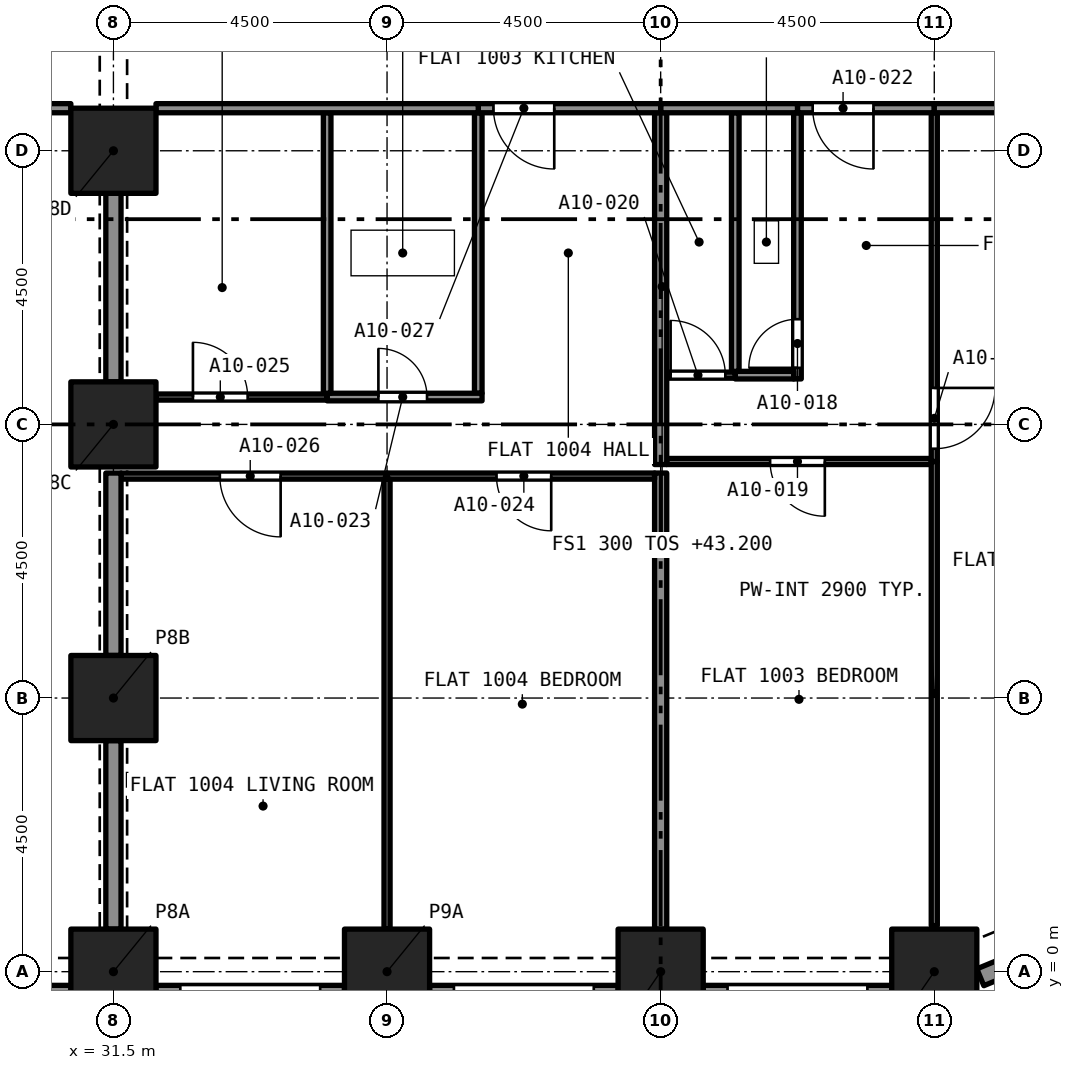
"""IFC4 building model, lengths in metres.
Left out: names, types, materials, properties, quantities, classifications, styles, units other than length and angle.
Written with IfcOpenShell. Run it as: python <this file> out.ifc"""

import sys

from ifc_helpers import new_model, si_unit, direction, frame, frame_2d, origin, origin_2d, place, context, subcontext, project, spatial, rectangle, extrude, element, fill, save


model = new_model("IFC4")
c1 = context("Model", 3, precision=1e-05, world=origin(), true_north=direction((0.0, 1.0)))
c2 = subcontext(c1, "Body", "Model", "MODEL_VIEW")
j1 = project(units=[si_unit("LENGTHUNIT", "METRE"), si_unit("PLANEANGLEUNIT", "RADIAN")], contexts=[c1])
p1 = place(None, origin())
s1 = spatial("IfcSite", under=j1, at=p1, CompositionType="ELEMENT")
p2 = place(p1, origin())
s2 = spatial("IfcBuilding", under=s1, at=p2, CompositionType="ELEMENT")
p3 = place(p2, frame((0.0, 0.0, 43.2)))
s3 = spatial("IfcBuildingStorey", under=s2, at=p3, CompositionType="ELEMENT", Elevation=43.2)
for number, where, z_axis, x_axis in (
    (1, (31.5, 0.0, 0.0), (0.0, 0.0, 1.0), (1.0, 0.0, 0.0)),
    (2, (36.0, 0.0, 0.0), (0.0, 0.0, 1.0), (1.0, 0.0, 0.0)),
    (3, (40.5, 0.0, 0.0), (0.0, 0.0, 1.0), (1.0, 0.0, 0.0)),
    (4, (45.0, 0.0, 0.0), (0.0, 0.0, 1.0), (1.0, 0.0, 0.0)),
    (5, (31.5, 4.5, 0.0), (0.0, 0.0, 1.0), (1.0, 0.0, 0.0)),
    (6, (31.5, 9.0, 0.0), (0.0, 0.0, 1.0), (1.0, 0.0, 0.0)),
    (7, (31.5, 13.5, 0.0), (0.0, 0.0, 1.0), (1.0, 0.0, 0.0)),
):
    element("IfcColumn", number, at=place(p3, frame(where, z_axis=z_axis, x_axis=x_axis)), inside=s3, PredefinedType="COLUMN", context=c2, shape_type="SweptSolid", body=[
        extrude(rectangle(XDim=1.4, YDim=1.4, at=origin_2d()), origin(), (0.0, 0.0, 1.0), 3.2),
    ])
p4 = place(p3, frame((30.8, -0.375, 0.0), z_axis=(0.0, 0.0, 1.0), x_axis=(-1.0, 0.0, 0.0)))
e8 = element("IfcWall", 8, at=p4, inside=s3, PredefinedType="SOLIDWALL", context=c2, shape_type="SweptSolid", body=[
    extrude(rectangle(XDim=3.1, YDim=0.3, at=frame_2d((1.55, 0.0))), origin(), (0.0, 0.0, 1.0), 3.2),
])
p5 = place(p4, frame((0.4, 0.0, 0.45)))
e9 = element("IfcOpeningElement", 9, at=p5, cuts=e8, PredefinedType="OPENING", context=c2, shape_type="SweptSolid", body=[
    extrude(rectangle(XDim=2.3, YDim=1.95, at=frame_2d((1.15, 0.975))), frame((0.0, 0.16, 0.0), z_axis=(0.0, -1.0, 0.0), x_axis=(1.0, 0.0, 0.0)), (0.0, 0.0, 1.0), 0.32),
])
p6 = place(p3, frame((35.3, -0.375, 0.0), z_axis=(0.0, 0.0, 1.0), x_axis=(-1.0, 0.0, 0.0)))
e10 = element("IfcWall", 10, at=p6, inside=s3, PredefinedType="SOLIDWALL", context=c2, shape_type="SweptSolid", body=[
    extrude(rectangle(XDim=3.1, YDim=0.3, at=frame_2d((1.55, 0.0))), origin(), (0.0, 0.0, 1.0), 3.2),
])
p7 = place(p6, frame((0.4, 0.0, 0.45)))
e11 = element("IfcOpeningElement", 11, at=p7, cuts=e10, PredefinedType="OPENING", context=c2, shape_type="SweptSolid", body=[
    extrude(rectangle(XDim=2.3, YDim=1.95, at=frame_2d((1.15, 0.975))), frame((0.0, 0.16, 0.0), z_axis=(0.0, -1.0, 0.0), x_axis=(1.0, 0.0, 0.0)), (0.0, 0.0, 1.0), 0.32),
])
p8 = place(p3, frame((39.8, -0.375, 0.0), z_axis=(0.0, 0.0, 1.0), x_axis=(-1.0, 0.0, 0.0)))
e12 = element("IfcWall", 12, at=p8, inside=s3, PredefinedType="SOLIDWALL", context=c2, shape_type="SweptSolid", body=[
    extrude(rectangle(XDim=3.1, YDim=0.3, at=frame_2d((1.55, 0.0))), origin(), (0.0, 0.0, 1.0), 3.2),
])
p9 = place(p8, frame((0.4, 0.0, 0.45)))
e13 = element("IfcOpeningElement", 13, at=p9, cuts=e12, PredefinedType="OPENING", context=c2, shape_type="SweptSolid", body=[
    extrude(rectangle(XDim=2.3, YDim=1.95, at=frame_2d((1.15, 0.975))), frame((0.0, 0.16, 0.0), z_axis=(0.0, -1.0, 0.0), x_axis=(1.0, 0.0, 0.0)), (0.0, 0.0, 1.0), 0.32),
])
p10 = place(p3, frame((44.3, -0.375, 0.0), z_axis=(0.0, 0.0, 1.0), x_axis=(-1.0, 0.0, 0.0)))
e14 = element("IfcWall", 14, at=p10, inside=s3, PredefinedType="SOLIDWALL", context=c2, shape_type="SweptSolid", body=[
    extrude(rectangle(XDim=3.1, YDim=0.3, at=frame_2d((1.55, 0.0))), origin(), (0.0, 0.0, 1.0), 3.2),
])
p11 = place(p10, frame((0.4, 0.0, 0.45)))
e15 = element("IfcOpeningElement", 15, at=p11, cuts=e14, PredefinedType="OPENING", context=c2, shape_type="SweptSolid", body=[
    extrude(rectangle(XDim=2.3, YDim=1.95, at=frame_2d((1.15, 0.975))), frame((0.0, 0.16, 0.0), z_axis=(0.0, -1.0, 0.0), x_axis=(1.0, 0.0, 0.0)), (0.0, 0.0, 1.0), 0.32),
])
p12 = place(p3, frame((47.48, 0.622, 0.0), z_axis=(0.0, 0.0, 1.0), x_axis=(-0.923903565336, -0.38262540684, 0.0)))
e16 = element("IfcWall", 16, at=p12, inside=s3, PredefinedType="SOLIDWALL", context=c2, shape_type="SweptSolid", body=[
    extrude(rectangle(XDim=1.865, YDim=0.3, at=frame_2d((0.933, 0.0))), origin(), (0.0, 0.0, 1.0), 3.2),
])
p13 = place(p12, frame((0.258, 0.0, 0.45)))
e17 = element("IfcOpeningElement", 17, at=p13, cuts=e16, PredefinedType="OPENING", context=c2, shape_type="SweptSolid", body=[
    extrude(rectangle(XDim=1.1, YDim=1.95, at=frame_2d((0.55, 0.975))), frame((0.0, 0.16, 0.0), z_axis=(0.0, -1.0, 0.0), x_axis=(1.0, 0.0, 0.0)), (0.0, 0.0, 1.0), 0.32),
])
p14 = place(p3, frame((42.75, 9.748, 0.0), z_axis=(0.0, 0.0, 1.0), x_axis=(0.0, 1.0, 0.0)))
e18 = element("IfcWall", 18, at=p14, inside=s3, PredefinedType="PARTITIONING", context=c2, shape_type="SweptSolid", body=[
    extrude(rectangle(XDim=4.377, YDim=0.125, at=frame_2d((2.189, 0.0))), origin(), (0.0, 0.0, 1.0), 2.9),
])
p15 = place(p14, frame((0.183, 0.0, 0.0)))
e19 = element("IfcOpeningElement", 19, at=p15, cuts=e18, PredefinedType="OPENING", context=c2, shape_type="SweptSolid", body=[
    extrude(rectangle(XDim=0.8, YDim=2.1, at=frame_2d((0.4, 1.05))), frame((0.0, 0.073, 0.0), z_axis=(0.0, -1.0, 0.0), x_axis=(1.0, 0.0, 0.0)), (0.0, 0.0, 1.0), 0.145),
])
p16 = place(p3, frame((41.727, 9.81, 0.0), z_axis=(0.0, 0.0, 1.0), x_axis=(1.0, 0.0, 0.0)))
e20 = element("IfcWall", 20, at=p16, inside=s3, PredefinedType="PARTITIONING", context=c2, shape_type="SweptSolid", body=[
    extrude(rectangle(XDim=0.96, YDim=0.125, at=frame_2d((0.48, 0.0))), origin(), (0.0, 0.0, 1.0), 2.9),
])
p17 = place(p3, frame((41.727, 9.873, 0.0), z_axis=(0.0, 0.0, 1.0), x_axis=(0.0, 1.0, 0.0)))
e21 = element("IfcWall", 21, at=p17, inside=s3, PredefinedType="PARTITIONING", context=c2, shape_type="SweptSolid", body=[
    extrude(rectangle(XDim=4.252, YDim=0.125, at=frame_2d((2.126, 0.0))), origin(), (0.0, 0.0, 1.0), 2.9),
])
p18 = place(p3, frame((44.95, 8.39, 0.0), z_axis=(0.0, 0.0, 1.0), x_axis=(-1.0, 0.0, 0.0)))
e22 = element("IfcWall", 22, at=p18, inside=s3, PredefinedType="PARTITIONING", context=c2, shape_type="SweptSolid", body=[
    extrude(rectangle(XDim=4.35, YDim=0.1, at=frame_2d((2.175, 0.0))), origin(), (0.0, 0.0, 1.0), 2.9),
])
p19 = place(p18, frame((1.75, 0.0, 0.0)))
e23 = element("IfcOpeningElement", 23, at=p19, cuts=e22, PredefinedType="OPENING", context=c2, shape_type="SweptSolid", body=[
    extrude(rectangle(XDim=0.9, YDim=2.1, at=frame_2d((0.45, 1.05))), frame((0.0, 0.06, 0.0), z_axis=(0.0, -1.0, 0.0), x_axis=(1.0, 0.0, 0.0)), (0.0, 0.0, 1.0), 0.12),
])
p20 = place(p3, frame((45.0, 0.758, 0.0), z_axis=(0.0, 0.0, 1.0), x_axis=(0.0, 1.0, 0.0)))
e24 = element("IfcWall", 24, at=p20, inside=s3, PredefinedType="PARTITIONING", context=c2, shape_type="SweptSolid", body=[
    extrude(rectangle(XDim=7.632, YDim=0.1, at=frame_2d((3.816, 0.0))), origin(), (0.0, 0.0, 1.0), 2.9),
])
p21 = place(p3, frame((40.5, 0.7, 0.0), z_axis=(0.0, 0.0, 1.0), x_axis=(0.0, 1.0, 0.0)))
e25 = element("IfcWall", 25, at=p21, inside=s3, PredefinedType="PARTITIONING", context=c2, shape_type="SweptSolid", body=[
    extrude(rectangle(XDim=7.5, YDim=0.2, at=frame_2d((3.75, 0.0))), origin(), (0.0, 0.0, 1.0), 2.9),
])
p22 = place(p3, frame((40.6, 9.81, 0.0), z_axis=(0.0, 0.0, 1.0), x_axis=(1.0, 0.0, 0.0)))
e26 = element("IfcWall", 26, at=p22, inside=s3, PredefinedType="PARTITIONING", context=c2, shape_type="SweptSolid", body=[
    extrude(rectangle(XDim=1.127, YDim=0.1, at=frame_2d((0.563, 0.0))), origin(), (0.0, 0.0, 1.0), 2.9),
])
p23 = place(p22, frame((0.064, 0.0, 0.0)))
e27 = element("IfcOpeningElement", 27, at=p23, cuts=e26, PredefinedType="OPENING", context=c2, shape_type="SweptSolid", body=[
    extrude(rectangle(XDim=0.9, YDim=2.1, at=frame_2d((0.45, 1.05))), frame((0.0, 0.06, 0.0), z_axis=(0.0, -1.0, 0.0), x_axis=(1.0, 0.0, 0.0)), (0.0, 0.0, 1.0), 0.12),
])
p24 = place(p3, frame((45.0, 14.125, 0.0), z_axis=(0.0, 0.0, 1.0), x_axis=(0.0, -1.0, 0.0)))
e28 = element("IfcWall", 28, at=p24, inside=s3, PredefinedType="PARTITIONING", context=c2, shape_type="SweptSolid", body=[
    extrude(rectangle(XDim=5.735, YDim=0.1, at=frame_2d((2.868, 0.0))), origin(), (0.0, 0.0, 1.0), 2.9),
])
p25 = place(p24, frame((4.525, 0.0, 0.0)))
e29 = element("IfcOpeningElement", 29, at=p25, cuts=e28, PredefinedType="OPENING", context=c2, shape_type="SweptSolid", body=[
    extrude(rectangle(XDim=1.0, YDim=2.1, at=frame_2d((0.5, 1.05))), frame((0.0, 0.06, 0.0), z_axis=(0.0, -1.0, 0.0), x_axis=(1.0, 0.0, 0.0)), (0.0, 0.0, 1.0), 0.12),
])
p26 = place(p3, frame((40.5, 8.34, 0.0), z_axis=(0.0, 0.0, 1.0), x_axis=(0.0, 1.0, 0.0)))
e30 = element("IfcWall", 30, at=p26, inside=s3, PredefinedType="PARTITIONING", context=c2, shape_type="SweptSolid", body=[
    extrude(rectangle(XDim=5.785, YDim=0.2, at=frame_2d((2.893, 0.0))), origin(), (0.0, 0.0, 1.0), 2.9),
])
p27 = place(p3, frame((45.0, 14.2, 0.0), z_axis=(0.0, 0.0, 1.0), x_axis=(-1.0, 0.0, 0.0)))
e31 = element("IfcWall", 31, at=p27, inside=s3, PredefinedType="PARTITIONING", context=c2, shape_type="SweptSolid", body=[
    extrude(rectangle(XDim=2.25, YDim=0.15, at=frame_2d((1.125, 0.0))), origin(), (0.0, 0.0, 1.0), 2.9),
])
p28 = place(p27, frame((1.0, 0.0, 0.0)))
e32 = element("IfcOpeningElement", 32, at=p28, cuts=e31, PredefinedType="OPENING", context=c2, shape_type="SweptSolid", body=[
    extrude(rectangle(XDim=1.0, YDim=2.1, at=frame_2d((0.5, 1.05))), frame((0.0, 0.085, 0.0), z_axis=(0.0, -1.0, 0.0), x_axis=(1.0, 0.0, 0.0)), (0.0, 0.0, 1.0), 0.17),
])
p29 = place(p3, frame((40.5, 14.2, 0.0), z_axis=(0.0, 0.0, 1.0), x_axis=(1.0, 0.0, 0.0)))
e33 = element("IfcWall", 33, at=p29, inside=s3, PredefinedType="PARTITIONING", context=c2, shape_type="SweptSolid", body=[
    extrude(rectangle(XDim=2.25, YDim=0.15, at=frame_2d((1.125, 0.0))), origin(), (0.0, 0.0, 1.0), 2.9),
])
p30 = place(p3, frame((45.0, 14.2, 0.0), z_axis=(0.0, 0.0, 1.0), x_axis=(1.0, 0.0, 0.0)))
e34 = element("IfcWall", 34, at=p30, inside=s3, PredefinedType="PARTITIONING", context=c2, shape_type="SweptSolid", body=[
    extrude(rectangle(XDim=3.8, YDim=0.15, at=frame_2d((1.9, 0.0))), origin(), (0.0, 0.0, 1.0), 2.9),
])
p31 = place(p3, frame((37.5, 9.512, 0.0), z_axis=(0.0, 0.0, 1.0), x_axis=(0.0, 1.0, 0.0)))
e35 = element("IfcWall", 35, at=p31, inside=s3, PredefinedType="PARTITIONING", context=c2, shape_type="SweptSolid", body=[
    extrude(rectangle(XDim=4.613, YDim=0.125, at=frame_2d((2.306, 0.0))), origin(), (0.0, 0.0, 1.0), 2.9),
])
p32 = place(p3, frame((35.015, 9.45, 0.0), z_axis=(0.0, 0.0, 1.0), x_axis=(1.0, 0.0, 0.0)))
e36 = element("IfcWall", 36, at=p32, inside=s3, PredefinedType="PARTITIONING", context=c2, shape_type="SweptSolid", body=[
    extrude(rectangle(XDim=2.547, YDim=0.125, at=frame_2d((1.273, 0.0))), origin(), (0.0, 0.0, 1.0), 2.9),
])
p33 = place(p32, frame((0.842, 0.0, 0.0)))
e37 = element("IfcOpeningElement", 37, at=p33, cuts=e36, PredefinedType="OPENING", context=c2, shape_type="SweptSolid", body=[
    extrude(rectangle(XDim=0.8, YDim=2.1, at=frame_2d((0.4, 1.05))), frame((0.0, 0.073, 0.0), z_axis=(0.0, -1.0, 0.0), x_axis=(1.0, 0.0, 0.0)), (0.0, 0.0, 1.0), 0.145),
])
p34 = place(p3, frame((35.015, 9.512, 0.0), z_axis=(0.0, 0.0, 1.0), x_axis=(0.0, 1.0, 0.0)))
e38 = element("IfcWall", 38, at=p34, inside=s3, PredefinedType="PARTITIONING", context=c2, shape_type="SweptSolid", body=[
    extrude(rectangle(XDim=4.613, YDim=0.125, at=frame_2d((2.306, 0.0))), origin(), (0.0, 0.0, 1.0), 2.9),
])
p35 = place(p3, frame((40.4, 8.15, 0.0), z_axis=(0.0, 0.0, 1.0), x_axis=(-1.0, 0.0, 0.0)))
e39 = element("IfcWall", 39, at=p35, inside=s3, PredefinedType="PARTITIONING", context=c2, shape_type="SweptSolid", body=[
    extrude(rectangle(XDim=4.4, YDim=0.1, at=frame_2d((2.2, 0.0))), origin(), (0.0, 0.0, 1.0), 2.9),
])
p36 = place(p35, frame((1.7, 0.0, 0.0)))
e40 = element("IfcOpeningElement", 40, at=p36, cuts=e39, PredefinedType="OPENING", context=c2, shape_type="SweptSolid", body=[
    extrude(rectangle(XDim=0.9, YDim=2.1, at=frame_2d((0.45, 1.05))), frame((0.0, 0.06, 0.0), z_axis=(0.0, -1.0, 0.0), x_axis=(1.0, 0.0, 0.0)), (0.0, 0.0, 1.0), 0.12),
])
p37 = place(p3, frame((36.0, 0.7, 0.0), z_axis=(0.0, 0.0, 1.0), x_axis=(0.0, 1.0, 0.0)))
e41 = element("IfcWall", 41, at=p37, inside=s3, PredefinedType="PARTITIONING", context=c2, shape_type="SweptSolid", body=[
    extrude(rectangle(XDim=7.4, YDim=0.1, at=frame_2d((3.7, 0.0))), origin(), (0.0, 0.0, 1.0), 2.9),
])
p38 = place(p3, frame((32.2, 9.45, 0.0), z_axis=(0.0, 0.0, 1.0), x_axis=(1.0, 0.0, 0.0)))
e42 = element("IfcWall", 42, at=p38, inside=s3, PredefinedType="PARTITIONING", context=c2, shape_type="SweptSolid", body=[
    extrude(rectangle(XDim=2.815, YDim=0.1, at=frame_2d((1.408, 0.0))), origin(), (0.0, 0.0, 1.0), 2.9),
])
p39 = place(p38, frame((0.608, 0.0, 0.0)))
e43 = element("IfcOpeningElement", 43, at=p39, cuts=e42, PredefinedType="OPENING", context=c2, shape_type="SweptSolid", body=[
    extrude(rectangle(XDim=0.9, YDim=2.1, at=frame_2d((0.45, 1.05))), frame((0.0, 0.06, 0.0), z_axis=(0.0, -1.0, 0.0), x_axis=(1.0, 0.0, 0.0)), (0.0, 0.0, 1.0), 0.12),
])
p40 = place(p3, frame((36.0, 8.15, 0.0), z_axis=(0.0, 0.0, 1.0), x_axis=(-1.0, 0.0, 0.0)))
e44 = element("IfcWall", 44, at=p40, inside=s3, PredefinedType="PARTITIONING", context=c2, shape_type="SweptSolid", body=[
    extrude(rectangle(XDim=4.375, YDim=0.1, at=frame_2d((2.188, 0.0))), origin(), (0.0, 0.0, 1.0), 2.9),
])
p41 = place(p40, frame((1.75, 0.0, 0.0)))
e45 = element("IfcOpeningElement", 45, at=p41, cuts=e44, PredefinedType="OPENING", context=c2, shape_type="SweptSolid", body=[
    extrude(rectangle(XDim=1.0, YDim=2.1, at=frame_2d((0.5, 1.05))), frame((0.0, 0.06, 0.0), z_axis=(0.0, -1.0, 0.0), x_axis=(1.0, 0.0, 0.0)), (0.0, 0.0, 1.0), 0.12),
])
p42 = place(p3, frame((40.5, 14.2, 0.0), z_axis=(0.0, 0.0, 1.0), x_axis=(-1.0, 0.0, 0.0)))
e46 = element("IfcWall", 46, at=p42, inside=s3, PredefinedType="PARTITIONING", context=c2, shape_type="SweptSolid", body=[
    extrude(rectangle(XDim=3.0, YDim=0.15, at=frame_2d((1.5, 0.0))), origin(), (0.0, 0.0, 1.0), 2.9),
])
p43 = place(p42, frame((1.75, 0.0, 0.0)))
e47 = element("IfcOpeningElement", 47, at=p43, cuts=e46, PredefinedType="OPENING", context=c2, shape_type="SweptSolid", body=[
    extrude(rectangle(XDim=1.0, YDim=2.1, at=frame_2d((0.5, 1.05))), frame((0.0, 0.085, 0.0), z_axis=(0.0, -1.0, 0.0), x_axis=(1.0, 0.0, 0.0)), (0.0, 0.0, 1.0), 0.17),
])
p44 = place(p3, frame((31.5, 9.7, 0.0), z_axis=(0.0, 0.0, 1.0), x_axis=(0.0, 1.0, 0.0)))
e48 = element("IfcWall", 48, at=p44, inside=s3, PredefinedType="PARTITIONING", context=c2, shape_type="SweptSolid", body=[
    extrude(rectangle(XDim=3.1, YDim=0.25, at=frame_2d((1.55, 0.0))), origin(), (0.0, 0.0, 1.0), 2.38),
])
p45 = place(p3, frame((32.2, 14.2, 0.0), z_axis=(0.0, 0.0, 1.0), x_axis=(1.0, 0.0, 0.0)))
e49 = element("IfcWall", 49, at=p45, inside=s3, PredefinedType="PARTITIONING", context=c2, shape_type="SweptSolid", body=[
    extrude(rectangle(XDim=5.3, YDim=0.15, at=frame_2d((2.65, 0.0))), origin(), (0.0, 0.0, 1.0), 2.9),
])
p46 = place(p3, frame((31.5, 0.7, 0.0), z_axis=(0.0, 0.0, 1.0), x_axis=(0.0, 1.0, 0.0)))
e50 = element("IfcWall", 50, at=p46, inside=s3, PredefinedType="PARTITIONING", context=c2, shape_type="SweptSolid", body=[
    extrude(rectangle(XDim=3.1, YDim=0.25, at=frame_2d((1.55, 0.0))), origin(), (0.0, 0.0, 1.0), 2.38),
])
p47 = place(p3, frame((31.5, 5.2, 0.0), z_axis=(0.0, 0.0, 1.0), x_axis=(0.0, 1.0, 0.0)))
e51 = element("IfcWall", 51, at=p47, inside=s3, PredefinedType="PARTITIONING", context=c2, shape_type="SweptSolid", body=[
    extrude(rectangle(XDim=3.0, YDim=0.25, at=frame_2d((1.5, 0.0))), origin(), (0.0, 0.0, 1.0), 2.38),
])
p48 = place(p3, frame((30.8, 14.2, 0.0), z_axis=(0.0, 0.0, 1.0), x_axis=(-1.0, 0.0, 0.0)))
e52 = element("IfcWall", 52, at=p48, inside=s3, PredefinedType="PARTITIONING", context=c2, shape_type="SweptSolid", body=[
    extrude(rectangle(XDim=3.8, YDim=0.15, at=frame_2d((1.9, 0.0))), origin(), (0.0, 0.0, 1.0), 2.75),
])
p49 = place(p48, frame((1.05, 0.0, 0.0)))
e53 = element("IfcOpeningElement", 53, at=p49, cuts=e52, PredefinedType="OPENING", context=c2, shape_type="SweptSolid", body=[
    extrude(rectangle(XDim=1.0, YDim=2.1, at=frame_2d((0.5, 1.05))), frame((0.0, 0.085, 0.0), z_axis=(0.0, -1.0, 0.0), x_axis=(1.0, 0.0, 0.0)), (0.0, 0.0, 1.0), 0.17),
])
p50 = place(p15, origin())
e54 = element("IfcDoor", 54, at=p50, inside=s3, OperationType="SINGLE_SWING_LEFT", PredefinedType="DOOR", context=c2, shape_type="SweptSolid", body=[
    extrude(rectangle(XDim=0.8, YDim=2.1, at=frame_2d((0.4, 1.05))), frame((0.0, 0.025, 0.0), z_axis=(0.0, -1.0, 0.0), x_axis=(1.0, 0.0, 0.0)), (0.0, 0.0, 1.0), 0.05),
])
fill(e19, e54)
p51 = place(p19, origin())
e55 = element("IfcDoor", 55, at=p51, inside=s3, OperationType="SINGLE_SWING_RIGHT", PredefinedType="DOOR", context=c2, shape_type="SweptSolid", body=[
    extrude(rectangle(XDim=0.9, YDim=2.1, at=frame_2d((0.45, 1.05))), frame((0.0, 0.025, 0.0), z_axis=(0.0, -1.0, 0.0), x_axis=(1.0, 0.0, 0.0)), (0.0, 0.0, 1.0), 0.05),
])
fill(e23, e55)
p52 = place(p23, origin())
e56 = element("IfcDoor", 56, at=p52, inside=s3, OperationType="SINGLE_SWING_LEFT", PredefinedType="DOOR", context=c2, shape_type="SweptSolid", body=[
    extrude(rectangle(XDim=0.9, YDim=2.1, at=frame_2d((0.45, 1.05))), frame((0.0, 0.025, 0.0), z_axis=(0.0, -1.0, 0.0), x_axis=(1.0, 0.0, 0.0)), (0.0, 0.0, 1.0), 0.05),
])
fill(e27, e56)
p53 = place(p25, origin())
e57 = element("IfcDoor", 57, at=p53, inside=s3, OperationType="SINGLE_SWING_RIGHT", PredefinedType="DOOR", context=c2, shape_type="SweptSolid", body=[
    extrude(rectangle(XDim=1.0, YDim=2.1, at=frame_2d((0.5, 1.05))), frame((0.0, 0.025, 0.0), z_axis=(0.0, -1.0, 0.0), x_axis=(1.0, 0.0, 0.0)), (0.0, 0.0, 1.0), 0.05),
])
fill(e29, e57)
p54 = place(p28, origin())
e58 = element("IfcDoor", 58, at=p54, inside=s3, OperationType="SINGLE_SWING_RIGHT", PredefinedType="DOOR", context=c2, shape_type="SweptSolid", body=[
    extrude(rectangle(XDim=1.0, YDim=2.1, at=frame_2d((0.5, 1.05))), frame((0.0, 0.025, 0.0), z_axis=(0.0, -1.0, 0.0), x_axis=(1.0, 0.0, 0.0)), (0.0, 0.0, 1.0), 0.05),
])
fill(e32, e58)
p55 = place(p33, origin())
e59 = element("IfcDoor", 59, at=p55, inside=s3, OperationType="SINGLE_SWING_LEFT", PredefinedType="DOOR", context=c2, shape_type="SweptSolid", body=[
    extrude(rectangle(XDim=0.8, YDim=2.1, at=frame_2d((0.4, 1.05))), frame((0.0, 0.025, 0.0), z_axis=(0.0, -1.0, 0.0), x_axis=(1.0, 0.0, 0.0)), (0.0, 0.0, 1.0), 0.05),
])
fill(e37, e59)
p56 = place(p36, origin())
e60 = element("IfcDoor", 60, at=p56, inside=s3, OperationType="SINGLE_SWING_LEFT", PredefinedType="DOOR", context=c2, shape_type="SweptSolid", body=[
    extrude(rectangle(XDim=0.9, YDim=2.1, at=frame_2d((0.45, 1.05))), frame((0.0, 0.025, 0.0), z_axis=(0.0, -1.0, 0.0), x_axis=(1.0, 0.0, 0.0)), (0.0, 0.0, 1.0), 0.05),
])
fill(e40, e60)
p57 = place(p39, origin())
e61 = element("IfcDoor", 61, at=p57, inside=s3, OperationType="SINGLE_SWING_LEFT", PredefinedType="DOOR", context=c2, shape_type="SweptSolid", body=[
    extrude(rectangle(XDim=0.9, YDim=2.1, at=frame_2d((0.45, 1.05))), frame((0.0, 0.025, 0.0), z_axis=(0.0, -1.0, 0.0), x_axis=(1.0, 0.0, 0.0)), (0.0, 0.0, 1.0), 0.05),
])
fill(e43, e61)
p58 = place(p41, origin())
e62 = element("IfcDoor", 62, at=p58, inside=s3, OperationType="SINGLE_SWING_RIGHT", PredefinedType="DOOR", context=c2, shape_type="SweptSolid", body=[
    extrude(rectangle(XDim=1.0, YDim=2.1, at=frame_2d((0.5, 1.05))), frame((0.0, 0.025, 0.0), z_axis=(0.0, -1.0, 0.0), x_axis=(1.0, 0.0, 0.0)), (0.0, 0.0, 1.0), 0.05),
])
fill(e45, e62)
p59 = place(p43, origin())
e63 = element("IfcDoor", 63, at=p59, inside=s3, OperationType="SINGLE_SWING_RIGHT", PredefinedType="DOOR", context=c2, shape_type="SweptSolid", body=[
    extrude(rectangle(XDim=1.0, YDim=2.1, at=frame_2d((0.5, 1.05))), frame((0.0, 0.025, 0.0), z_axis=(0.0, -1.0, 0.0), x_axis=(1.0, 0.0, 0.0)), (0.0, 0.0, 1.0), 0.05),
])
fill(e47, e63)
save(model, sys.argv[1])
